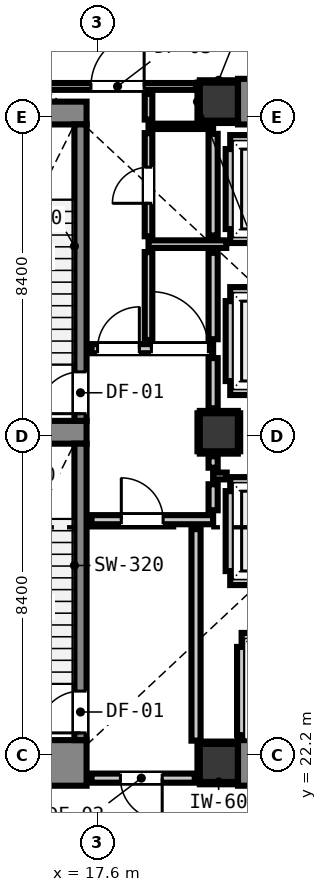
"""IFC4 building model, lengths in metres.
Left out: names, types, materials, properties, quantities, classifications, styles, units other than length and angle.
Written with IfcOpenShell. Run it as: python <this file> out.ifc"""

import sys

from ifc_helpers import new_model, si_unit, direction, frame, frame_2d, origin, origin_2d, place, context, subcontext, project, spatial, rectangle, extrude, element, fill, save


model = new_model("IFC4")
c1 = context("Model", 3, precision=1e-05, world=origin(), true_north=direction((0.0, 1.0)))
c2 = subcontext(c1, "Body", "Model", "MODEL_VIEW")
j1 = project(units=[si_unit("LENGTHUNIT", "METRE"), si_unit("PLANEANGLEUNIT", "RADIAN")], contexts=[c1])
p1 = place(None, origin())
s1 = spatial("IfcSite", under=j1, at=p1, CompositionType="ELEMENT")
p2 = place(p1, origin())
s2 = spatial("IfcBuilding", under=s1, at=p2, CompositionType="ELEMENT")
p3 = place(p2, origin())
s3 = spatial("IfcBuildingStorey", under=s2, at=p3, CompositionType="ELEMENT", Elevation=0.0)
for number, where, z_axis, x_axis in (
    (1, (20.8, 22.0, 0.0), (0.0, 0.0, 1.0), (1.0, 0.0, 0.0)),
    (2, (20.8, 39.4, 0.0), (0.0, 0.0, 1.0), (1.0, 0.0, 0.0)),
):
    element("IfcColumn", number, at=place(p3, frame(where, z_axis=z_axis, x_axis=x_axis)), inside=s3, PredefinedType="COLUMN", context=c2, shape_type="SweptSolid", body=[
        extrude(rectangle(XDim=1.0, YDim=1.0, at=origin_2d()), origin(), (0.0, 0.0, 1.0), 5.2),
    ])
p4 = place(p3, frame((13.24, 22.0, 0.0), z_axis=(0.0, 0.0, 1.0), x_axis=(1.0, 0.0, 0.0)))
e3 = element("IfcWall", 3, at=p4, inside=s3, PredefinedType="SHEAR", context=c2, shape_type="SweptSolid", body=[
    extrude(rectangle(XDim=4.08, YDim=1.2, at=frame_2d((2.04, 0.0))), origin(), (0.0, 0.0, 1.0), 5.2),
])
p5 = place(p3, frame((13.24, 39.1, 0.0), z_axis=(0.0, 0.0, 1.0), x_axis=(1.0, 0.0, 0.0)))
e4 = element("IfcWall", 4, at=p5, inside=s3, PredefinedType="SHEAR", context=c2, shape_type="SweptSolid", body=[
    extrude(rectangle(XDim=4.08, YDim=0.6, at=frame_2d((2.04, 0.0))), origin(), (0.0, 0.0, 1.0), 5.2),
])
p6 = place(p3, frame((13.905, 30.7, 0.0), z_axis=(0.0, 0.0, 1.0), x_axis=(1.0, 0.0, 0.0)))
e5 = element("IfcWall", 5, at=p6, inside=s3, PredefinedType="SHEAR", context=c2, shape_type="SweptSolid", body=[
    extrude(rectangle(XDim=3.415, YDim=0.6, at=frame_2d((1.708, 0.0))), origin(), (0.0, 0.0, 1.0), 5.2),
])
for number, where, z_axis, x_axis in (
    (6, (21.305, 22.0, 0.0), (0.0, 0.0, 1.0), (1.0, 0.0, 0.0)),
    (7, (21.305, 39.4, 0.0), (0.0, 0.0, 1.0), (1.0, 0.0, 0.0)),
):
    element("IfcWall", number, at=place(p3, frame(where, z_axis=z_axis, x_axis=x_axis)), inside=s3, PredefinedType="SHEAR", context=c2, shape_type="SweptSolid", body=[
        extrude(rectangle(XDim=7.39, YDim=1.2, at=frame_2d((3.695, 0.0))), origin(), (0.0, 0.0, 1.0), 5.2),
    ])
p7 = place(p3, frame((17.16, 31.0, 0.0), z_axis=(0.0, 0.0, 1.0), x_axis=(0.0, 1.0, 0.0)))
e8 = element("IfcWall", 8, at=p7, inside=s3, PredefinedType="SHEAR", context=c2, shape_type="SweptSolid", body=[
    extrude(rectangle(XDim=7.8, YDim=0.32, at=frame_2d((3.9, 0.0))), origin(), (0.0, 0.0, 1.0), 5.2),
])
p8 = place(p7, frame((0.19, 0.0, 0.0)))
e9 = element("IfcOpeningElement", 9, at=p8, cuts=e8, PredefinedType="OPENING", context=c2, shape_type="SweptSolid", body=[
    extrude(rectangle(XDim=1.1, YDim=2.15, at=frame_2d((0.55, 1.075))), frame((0.0, 0.17, 0.0), z_axis=(0.0, -1.0, 0.0), x_axis=(1.0, 0.0, 0.0)), (0.0, 0.0, 1.0), 0.34),
])
p9 = place(p3, frame((17.16, 22.6, 0.0), z_axis=(0.0, 0.0, 1.0), x_axis=(0.0, 1.0, 0.0)))
e10 = element("IfcWall", 10, at=p9, inside=s3, PredefinedType="SHEAR", context=c2, shape_type="SweptSolid", body=[
    extrude(rectangle(XDim=7.8, YDim=0.32, at=frame_2d((3.9, 0.0))), origin(), (0.0, 0.0, 1.0), 5.2),
])
p10 = place(p9, frame((0.19, 0.0, 0.0)))
e11 = element("IfcOpeningElement", 11, at=p10, cuts=e10, PredefinedType="OPENING", context=c2, shape_type="SweptSolid", body=[
    extrude(rectangle(XDim=1.1, YDim=2.15, at=frame_2d((0.55, 1.075))), frame((0.0, 0.17, 0.0), z_axis=(0.0, -1.0, 0.0), x_axis=(1.0, 0.0, 0.0)), (0.0, 0.0, 1.0), 0.34),
])
p11 = place(p3, frame((20.8, 30.7, 0.0), z_axis=(0.0, 0.0, 1.0), x_axis=(1.0, 0.0, 0.0)))
e12 = element("IfcColumn", 12, at=p11, inside=s3, PredefinedType="COLUMN", context=c2, shape_type="SweptSolid", body=[
    extrude(rectangle(XDim=1.0, YDim=1.0, at=origin_2d()), origin(), (0.0, 0.0, 1.0), 5.2),
])
for number, where, z_axis, x_axis in (
    (13, (21.1, 35.8, 0.0), (0.0, 0.0, 1.0), (1.0, 0.0, 0.0)),
    (14, (21.1, 38.4, 0.0), (0.0, 0.0, 1.0), (1.0, 0.0, 0.0)),
):
    element("IfcWall", number, at=place(p3, frame(where, z_axis=z_axis, x_axis=x_axis)), inside=s3, PredefinedType="PARTITIONING", context=c2, shape_type="SweptSolid", body=[
        extrude(rectangle(XDim=2.2, YDim=0.24, at=frame_2d((1.1, 0.0))), origin(), (0.0, 0.0, 1.0), 4.92),
    ])
p12 = place(p3, frame((21.1, 36.048, 0.0), z_axis=(0.0, 0.0, 1.0), x_axis=(0.0, 1.0, 0.0)))
e15 = element("IfcWall", 15, at=p12, inside=s3, PredefinedType="PARTITIONING", context=c2, shape_type="SweptSolid", body=[
    extrude(rectangle(XDim=2.104, YDim=0.24, at=frame_2d((1.052, 0.0))), origin(), (0.0, 0.0, 1.0), 3.955),
])
for number, where, z_axis, x_axis in (
    (16, (21.1, 31.8, 0.0), (0.0, 0.0, 1.0), (1.0, 0.0, 0.0)),
    (17, (21.1, 34.4, 0.0), (0.0, 0.0, 1.0), (1.0, 0.0, 0.0)),
):
    element("IfcWall", number, at=place(p3, frame(where, z_axis=z_axis, x_axis=x_axis)), inside=s3, PredefinedType="PARTITIONING", context=c2, shape_type="SweptSolid", body=[
        extrude(rectangle(XDim=2.2, YDim=0.24, at=frame_2d((1.1, 0.0))), origin(), (0.0, 0.0, 1.0), 4.92),
    ])
p13 = place(p3, frame((21.1, 32.048, 0.0), z_axis=(0.0, 0.0, 1.0), x_axis=(0.0, 1.0, 0.0)))
e18 = element("IfcWall", 18, at=p13, inside=s3, PredefinedType="PARTITIONING", context=c2, shape_type="SweptSolid", body=[
    extrude(rectangle(XDim=2.104, YDim=0.24, at=frame_2d((1.052, 0.0))), origin(), (0.0, 0.0, 1.0), 3.955),
])
for number, where, z_axis, x_axis in (
    (19, (21.1, 26.8, 0.0), (0.0, 0.0, 1.0), (1.0, 0.0, 0.0)),
    (20, (21.1, 29.4, 0.0), (0.0, 0.0, 1.0), (1.0, 0.0, 0.0)),
):
    element("IfcWall", number, at=place(p3, frame(where, z_axis=z_axis, x_axis=x_axis)), inside=s3, PredefinedType="PARTITIONING", context=c2, shape_type="SweptSolid", body=[
        extrude(rectangle(XDim=2.2, YDim=0.24, at=frame_2d((1.1, 0.0))), origin(), (0.0, 0.0, 1.0), 4.92),
    ])
p14 = place(p3, frame((21.1, 27.048, 0.0), z_axis=(0.0, 0.0, 1.0), x_axis=(0.0, 1.0, 0.0)))
e21 = element("IfcWall", 21, at=p14, inside=s3, PredefinedType="PARTITIONING", context=c2, shape_type="SweptSolid", body=[
    extrude(rectangle(XDim=2.104, YDim=0.24, at=frame_2d((1.052, 0.0))), origin(), (0.0, 0.0, 1.0), 3.955),
])
p15 = place(p3, frame((21.4, 25.3, 0.0), z_axis=(0.0, 0.0, 1.0), x_axis=(1.0, 0.0, 0.0)))
e22 = element("IfcWall", 22, at=p15, inside=s3, PredefinedType="PARTITIONING", context=c2, shape_type="SweptSolid", body=[
    extrude(rectangle(XDim=2.4, YDim=0.24, at=frame_2d((1.2, 0.0))), origin(), (0.0, 0.0, 1.0), 4.92),
])
p16 = place(p3, frame((21.4, 22.73, 0.0), z_axis=(0.0, 0.0, 1.0), x_axis=(0.0, 1.0, 0.0)))
e23 = element("IfcWall", 23, at=p16, inside=s3, PredefinedType="PARTITIONING", context=c2, shape_type="SweptSolid", body=[
    extrude(rectangle(XDim=2.322, YDim=0.24, at=frame_2d((1.161, 0.0))), origin(), (0.0, 0.0, 1.0), 4.92),
])
p17 = place(p3, frame((20.168, 21.6, 0.0), z_axis=(0.0, 0.0, 1.0), x_axis=(-1.0, 0.0, 0.0)))
e24 = element("IfcWall", 24, at=p17, inside=s3, PredefinedType="PARTITIONING", context=c2, shape_type="SweptSolid", body=[
    extrude(rectangle(XDim=2.718, YDim=0.24, at=frame_2d((1.359, 0.0))), origin(), (0.0, 0.0, 1.0), 4.155),
])
p18 = place(p17, frame((0.858, 0.0, 0.0)))
e25 = element("IfcOpeningElement", 25, at=p18, cuts=e24, PredefinedType="OPENING", context=c2, shape_type="SweptSolid", body=[
    extrude(rectangle(XDim=1.1, YDim=2.15, at=frame_2d((0.55, 1.075))), frame((0.0, 0.13, 0.0), z_axis=(0.0, -1.0, 0.0), x_axis=(1.0, 0.0, 0.0)), (0.0, 0.0, 1.0), 0.26),
])
p19 = place(p3, frame((17.45, 28.4, 0.0), z_axis=(0.0, 0.0, 1.0), x_axis=(1.0, 0.0, 0.0)))
e26 = element("IfcWall", 26, at=p19, inside=s3, PredefinedType="PARTITIONING", context=c2, shape_type="SweptSolid", body=[
    extrude(rectangle(XDim=3.2, YDim=0.24, at=frame_2d((1.6, 0.0))), origin(), (0.0, 0.0, 1.0), 4.92),
])
p20 = place(p19, frame((0.784, 0.0, 0.0)))
e27 = element("IfcOpeningElement", 27, at=p20, cuts=e26, PredefinedType="OPENING", context=c2, shape_type="SweptSolid", body=[
    extrude(rectangle(XDim=1.1, YDim=2.15, at=frame_2d((0.55, 1.075))), frame((0.0, 0.13, 0.0), z_axis=(0.0, -1.0, 0.0), x_axis=(1.0, 0.0, 0.0)), (0.0, 0.0, 1.0), 0.26),
])
p21 = place(p3, frame((17.45, 32.9, 0.0), z_axis=(0.0, 0.0, 1.0), x_axis=(1.0, 0.0, 0.0)))
e28 = element("IfcWall", 28, at=p21, inside=s3, PredefinedType="PARTITIONING", context=c2, shape_type="SweptSolid", body=[
    extrude(rectangle(XDim=3.2, YDim=0.24, at=frame_2d((1.6, 0.0))), origin(), (0.0, 0.0, 1.0), 4.92),
])
p22 = place(p21, frame((0.159, 0.0, 0.0)))
e29 = element("IfcOpeningElement", 29, at=p22, cuts=e28, PredefinedType="OPENING", context=c2, shape_type="SweptSolid", body=[
    extrude(rectangle(XDim=1.1, YDim=2.15, at=frame_2d((0.55, 1.075))), frame((0.0, 0.13, 0.0), z_axis=(0.0, -1.0, 0.0), x_axis=(1.0, 0.0, 0.0)), (0.0, 0.0, 1.0), 0.26),
])
p23 = place(p21, frame((1.576, 0.0, 0.0)))
e30 = element("IfcOpeningElement", 30, at=p23, cuts=e28, PredefinedType="OPENING", context=c2, shape_type="SweptSolid", body=[
    extrude(rectangle(XDim=1.5, YDim=2.15, at=frame_2d((0.75, 1.075))), frame((0.0, 0.13, 0.0), z_axis=(0.0, -1.0, 0.0), x_axis=(1.0, 0.0, 0.0)), (0.0, 0.0, 1.0), 0.26),
])
p24 = place(p3, frame((18.95, 35.65, 0.0), z_axis=(0.0, 0.0, 1.0), x_axis=(1.0, 0.0, 0.0)))
e31 = element("IfcWall", 31, at=p24, inside=s3, PredefinedType="PARTITIONING", context=c2, shape_type="SweptSolid", body=[
    extrude(rectangle(XDim=2.046, YDim=0.2, at=frame_2d((1.023, 0.0))), origin(), (0.0, 0.0, 1.0), 4.92),
])
p25 = place(p3, frame((20.65, 29.55, 0.0), z_axis=(0.0, 0.0, 1.0), x_axis=(1.0, 0.0, 0.0)))
e32 = element("IfcWall", 32, at=p25, inside=s3, PredefinedType="PARTITIONING", context=c2, shape_type="SweptSolid", body=[
    extrude(rectangle(XDim=0.357, YDim=0.18, at=frame_2d((0.179, 0.0))), origin(), (0.0, 0.0, 1.0), 4.92),
])
p26 = place(p3, frame((10.5, 39.8, 0.0), z_axis=(0.0, 0.0, 1.0), x_axis=(1.0, 0.0, 0.0)))
e33 = element("IfcWall", 33, at=p26, inside=s3, PredefinedType="PARTITIONING", context=c2, shape_type="SweptSolid", body=[
    extrude(rectangle(XDim=9.698, YDim=0.18, at=frame_2d((4.849, 0.0))), origin(), (0.0, 0.0, 1.0), 4.155),
])
p27 = place(p26, frame((6.935, 0.0, 0.0)))
e34 = element("IfcOpeningElement", 34, at=p27, cuts=e33, PredefinedType="OPENING", context=c2, shape_type="SweptSolid", body=[
    extrude(rectangle(XDim=1.4, YDim=2.15, at=frame_2d((0.7, 1.075))), frame((0.0, 0.1, 0.0), z_axis=(0.0, -1.0, 0.0), x_axis=(1.0, 0.0, 0.0)), (0.0, 0.0, 1.0), 0.2),
])
p28 = place(p26, frame((0.324, 0.0, 0.0)))
e35 = element("IfcOpeningElement", 35, at=p28, cuts=e33, PredefinedType="OPENING", context=c2, shape_type="SweptSolid", body=[
    extrude(rectangle(XDim=1.4, YDim=2.15, at=frame_2d((0.7, 1.075))), frame((0.0, 0.1, 0.0), z_axis=(0.0, -1.0, 0.0), x_axis=(1.0, 0.0, 0.0)), (0.0, 0.0, 1.0), 0.2),
])
p29 = place(p3, frame((18.95, 38.75, 0.0), z_axis=(0.0, 0.0, 1.0), x_axis=(1.0, 0.0, 0.0)))
e36 = element("IfcWall", 36, at=p29, inside=s3, PredefinedType="PARTITIONING", context=c2, shape_type="SweptSolid", body=[
    extrude(rectangle(XDim=1.7, YDim=0.14, at=frame_2d((0.85, 0.0))), origin(), (0.0, 0.0, 1.0), 4.92),
])
p30 = place(p3, frame((20.2, 22.586, 0.0), z_axis=(0.0, 0.0, 1.0), x_axis=(0.0, 1.0, 0.0)))
e37 = element("IfcWall", 37, at=p30, inside=s3, PredefinedType="PARTITIONING", context=c2, shape_type="SweptSolid", body=[
    extrude(rectangle(XDim=5.566, YDim=0.24, at=frame_2d((2.783, 0.0))), origin(), (0.0, 0.0, 1.0), 4.92),
])
p31 = place(p3, frame((20.65, 28.648, 0.0), z_axis=(0.0, 0.0, 1.0), x_axis=(0.0, 1.0, 0.0)))
e38 = element("IfcWall", 38, at=p31, inside=s3, PredefinedType="PARTITIONING", context=c2, shape_type="SweptSolid", body=[
    extrude(rectangle(XDim=0.684, YDim=0.24, at=frame_2d((0.342, 0.0))), origin(), (0.0, 0.0, 1.0), 3.955),
])
p32 = place(p3, frame((20.65, 29.768, 0.0), z_axis=(0.0, 0.0, 1.0), x_axis=(0.0, 1.0, 0.0)))
e39 = element("IfcWall", 39, at=p32, inside=s3, PredefinedType="PARTITIONING", context=c2, shape_type="SweptSolid", body=[
    extrude(rectangle(XDim=0.3, YDim=0.24, at=frame_2d((0.15, 0.0))), origin(), (0.0, 0.0, 1.0), 3.955),
])
p33 = place(p3, frame((20.65, 31.332, 0.0), z_axis=(0.0, 0.0, 1.0), x_axis=(0.0, 1.0, 0.0)))
e40 = element("IfcWall", 40, at=p33, inside=s3, PredefinedType="PARTITIONING", context=c2, shape_type="SweptSolid", body=[
    extrude(rectangle(XDim=1.32, YDim=0.24, at=frame_2d((0.66, 0.0))), origin(), (0.0, 0.0, 1.0), 3.955),
])
p34 = place(p3, frame((20.65, 33.148, 0.0), z_axis=(0.0, 0.0, 1.0), x_axis=(0.0, 1.0, 0.0)))
e41 = element("IfcWall", 41, at=p34, inside=s3, PredefinedType="PARTITIONING", context=c2, shape_type="SweptSolid", body=[
    extrude(rectangle(XDim=2.274, YDim=0.24, at=frame_2d((1.137, 0.0))), origin(), (0.0, 0.0, 1.0), 3.955),
])
p35 = place(p3, frame((20.65, 35.878, 0.0), z_axis=(0.0, 0.0, 1.0), x_axis=(0.0, 1.0, 0.0)))
e42 = element("IfcWall", 42, at=p35, inside=s3, PredefinedType="PARTITIONING", context=c2, shape_type="SweptSolid", body=[
    extrude(rectangle(XDim=2.674, YDim=0.24, at=frame_2d((1.337, 0.0))), origin(), (0.0, 0.0, 1.0), 3.955),
])
p36 = place(p3, frame((18.95, 33.128, 0.0), z_axis=(0.0, 0.0, 1.0), x_axis=(0.0, 1.0, 0.0)))
e43 = element("IfcWall", 43, at=p36, inside=s3, PredefinedType="PARTITIONING", context=c2, shape_type="SweptSolid", body=[
    extrude(rectangle(XDim=2.314, YDim=0.2, at=frame_2d((1.157, 0.0))), origin(), (0.0, 0.0, 1.0), 4.92),
])
p37 = place(p3, frame((18.95, 35.858, 0.0), z_axis=(0.0, 0.0, 1.0), x_axis=(0.0, 1.0, 0.0)))
e44 = element("IfcWall", 44, at=p37, inside=s3, PredefinedType="PARTITIONING", context=c2, shape_type="SweptSolid", body=[
    extrude(rectangle(XDim=2.714, YDim=0.2, at=frame_2d((1.357, 0.0))), origin(), (0.0, 0.0, 1.0), 4.92),
])
p38 = place(p37, frame((0.867, 0.0, 0.0)))
e45 = element("IfcOpeningElement", 45, at=p38, cuts=e44, PredefinedType="OPENING", context=c2, shape_type="SweptSolid", body=[
    extrude(rectangle(XDim=0.95, YDim=2.1, at=frame_2d((0.475, 1.05))), frame((0.0, 0.11, 0.0), z_axis=(0.0, -1.0, 0.0), x_axis=(1.0, 0.0, 0.0)), (0.0, 0.0, 1.0), 0.22),
])
p39 = place(p3, frame((18.95, 38.928, 0.0), z_axis=(0.0, 0.0, 1.0), x_axis=(0.0, 1.0, 0.0)))
e46 = element("IfcWall", 46, at=p39, inside=s3, PredefinedType="PARTITIONING", context=c2, shape_type="SweptSolid", body=[
    extrude(rectangle(XDim=0.674, YDim=0.2, at=frame_2d((0.337, 0.0))), origin(), (0.0, 0.0, 1.0), 4.92),
])
for number, where, z_axis, x_axis in (
    (47, (20.3, 21.468, 0.0), (0.0, 0.0, 1.0), (1.0, 0.0, 0.0)),
    (48, (20.3, 22.532, 0.0), (0.0, 0.0, 1.0), (1.0, 0.0, 0.0)),
):
    element("IfcWall", number, at=place(p3, frame(where, z_axis=z_axis, x_axis=x_axis)), inside=s3, PredefinedType="PARTITIONING", context=c2, shape_type="SweptSolid", body=[
        extrude(rectangle(XDim=0.99, YDim=0.06, at=frame_2d((0.495, 0.0))), origin(), (0.0, 0.0, 1.0), 1.45),
    ])
p40 = place(p3, frame((20.268, 21.5, 0.0), z_axis=(0.0, 0.0, 1.0), x_axis=(0.0, 1.0, 0.0)))
e49 = element("IfcWall", 49, at=p40, inside=s3, PredefinedType="PARTITIONING", context=c2, shape_type="SweptSolid", body=[
    extrude(rectangle(XDim=1.0, YDim=0.06, at=frame_2d((0.5, 0.0))), origin(), (0.0, 0.0, 1.0), 1.45),
])
for number, where, z_axis, x_axis in (
    (50, (20.3, 38.868, 0.0), (0.0, 0.0, 1.0), (1.0, 0.0, 0.0)),
    (51, (20.3, 39.932, 0.0), (0.0, 0.0, 1.0), (1.0, 0.0, 0.0)),
):
    element("IfcWall", number, at=place(p3, frame(where, z_axis=z_axis, x_axis=x_axis)), inside=s3, PredefinedType="PARTITIONING", context=c2, shape_type="SweptSolid", body=[
        extrude(rectangle(XDim=0.99, YDim=0.06, at=frame_2d((0.495, 0.0))), origin(), (0.0, 0.0, 1.0), 1.45),
    ])
for number, where, z_axis, x_axis in (
    (52, (20.268, 38.9, 0.0), (0.0, 0.0, 1.0), (0.0, 1.0, 0.0)),
    (53, (20.3, 30.168, 0.0), (0.0, 0.0, 1.0), (1.0, 0.0, 0.0)),
    (54, (20.3, 31.232, 0.0), (0.0, 0.0, 1.0), (1.0, 0.0, 0.0)),
    (55, (20.268, 30.2, 0.0), (0.0, 0.0, 1.0), (0.0, 1.0, 0.0)),
    (56, (21.332, 30.2, 0.0), (0.0, 0.0, 1.0), (0.0, 1.0, 0.0)),
):
    element("IfcWall", number, at=place(p3, frame(where, z_axis=z_axis, x_axis=x_axis)), inside=s3, PredefinedType="PARTITIONING", context=c2, shape_type="SweptSolid", body=[
        extrude(rectangle(XDim=1.0, YDim=0.06, at=frame_2d((0.5, 0.0))), origin(), (0.0, 0.0, 1.0), 1.45),
    ])
p41 = place(p8, origin())
e57 = element("IfcDoor", 57, at=p41, inside=s3, OperationType="SINGLE_SWING_LEFT", PredefinedType="DOOR", context=c2, shape_type="SweptSolid", body=[
    extrude(rectangle(XDim=1.1, YDim=2.15, at=frame_2d((0.55, 1.075))), frame((0.0, 0.025, 0.0), z_axis=(0.0, -1.0, 0.0), x_axis=(1.0, 0.0, 0.0)), (0.0, 0.0, 1.0), 0.05),
])
fill(e9, e57)
p42 = place(p10, origin())
e58 = element("IfcDoor", 58, at=p42, inside=s3, OperationType="SINGLE_SWING_LEFT", PredefinedType="DOOR", context=c2, shape_type="SweptSolid", body=[
    extrude(rectangle(XDim=1.1, YDim=2.15, at=frame_2d((0.55, 1.075))), frame((0.0, 0.025, 0.0), z_axis=(0.0, -1.0, 0.0), x_axis=(1.0, 0.0, 0.0)), (0.0, 0.0, 1.0), 0.05),
])
fill(e11, e58)
p43 = place(p20, origin())
e59 = element("IfcDoor", 59, at=p43, inside=s3, OperationType="SINGLE_SWING_LEFT", PredefinedType="DOOR", context=c2, shape_type="SweptSolid", body=[
    extrude(rectangle(XDim=1.1, YDim=2.15, at=frame_2d((0.55, 1.075))), frame((0.0, 0.025, 0.0), z_axis=(0.0, -1.0, 0.0), x_axis=(1.0, 0.0, 0.0)), (0.0, 0.0, 1.0), 0.05),
])
fill(e27, e59)
p44 = place(p22, origin())
e60 = element("IfcDoor", 60, at=p44, inside=s3, OperationType="SINGLE_SWING_RIGHT", PredefinedType="DOOR", context=c2, shape_type="SweptSolid", body=[
    extrude(rectangle(XDim=1.1, YDim=2.15, at=frame_2d((0.55, 1.075))), frame((0.0, 0.025, 0.0), z_axis=(0.0, -1.0, 0.0), x_axis=(1.0, 0.0, 0.0)), (0.0, 0.0, 1.0), 0.05),
])
fill(e29, e60)
p45 = place(p18, origin())
e61 = element("IfcDoor", 61, at=p45, inside=s3, OperationType="SINGLE_SWING_LEFT", PredefinedType="DOOR", context=c2, shape_type="SweptSolid", body=[
    extrude(rectangle(XDim=1.1, YDim=2.15, at=frame_2d((0.55, 1.075))), frame((0.0, 0.025, 0.0), z_axis=(0.0, -1.0, 0.0), x_axis=(1.0, 0.0, 0.0)), (0.0, 0.0, 1.0), 0.05),
])
fill(e25, e61)
p46 = place(p27, origin())
e62 = element("IfcDoor", 62, at=p46, inside=s3, OperationType="SINGLE_SWING_RIGHT", PredefinedType="DOOR", context=c2, shape_type="SweptSolid", body=[
    extrude(rectangle(XDim=1.4, YDim=2.15, at=frame_2d((0.7, 1.075))), frame((0.0, 0.025, 0.0), z_axis=(0.0, -1.0, 0.0), x_axis=(1.0, 0.0, 0.0)), (0.0, 0.0, 1.0), 0.05),
])
fill(e34, e62)
p47 = place(p23, origin())
e63 = element("IfcDoor", 63, at=p47, inside=s3, OperationType="SINGLE_SWING_LEFT", PredefinedType="DOOR", context=c2, shape_type="SweptSolid", body=[
    extrude(rectangle(XDim=1.5, YDim=2.15, at=frame_2d((0.75, 1.075))), frame((0.0, 0.025, 0.0), z_axis=(0.0, -1.0, 0.0), x_axis=(1.0, 0.0, 0.0)), (0.0, 0.0, 1.0), 0.05),
])
fill(e30, e63)
p48 = place(p38, origin())
e64 = element("IfcDoor", 64, at=p48, inside=s3, OperationType="SINGLE_SWING_LEFT", PredefinedType="DOOR", context=c2, shape_type="SweptSolid", body=[
    extrude(rectangle(XDim=0.95, YDim=2.1, at=frame_2d((0.475, 1.05))), frame((0.0, 0.025, 0.0), z_axis=(0.0, -1.0, 0.0), x_axis=(1.0, 0.0, 0.0)), (0.0, 0.0, 1.0), 0.05),
])
fill(e45, e64)
save(model, sys.argv[1])
